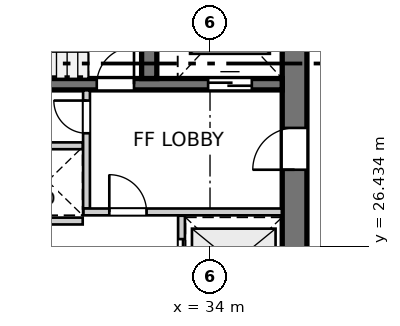
"""IFC4 building model, lengths in metres.
Left out: names, types, materials, properties, quantities, classifications, styles, units other than length and angle.
Written with IfcOpenShell. Run it as: python <this file> out.ifc"""

import sys

from ifc_helpers import new_model, si_unit, direction, frame, frame_2d, origin, place, context, subcontext, project, spatial, rectangle, extrude, source, transform, mapped, element, fill, save


model = new_model("IFC4")
c1 = context("Model", 3, precision=1e-05, world=origin(), true_north=direction((0.0, 1.0)))
c2 = subcontext(c1, "Body", "Model", "MODEL_VIEW")
j1 = project(units=[si_unit("LENGTHUNIT", "METRE"), si_unit("PLANEANGLEUNIT", "RADIAN")], contexts=[c1])
p1 = place(None, origin())
s1 = spatial("IfcSite", under=j1, at=p1, CompositionType="ELEMENT")
p2 = place(p1, origin())
s2 = spatial("IfcBuilding", under=s1, at=p2, CompositionType="ELEMENT")
p3 = place(p2, frame((0.0, 0.0, 89.6)))
s3 = spatial("IfcBuildingStorey", under=s2, at=p3, CompositionType="ELEMENT", Elevation=89.6)
p4 = place(p3, frame((36.225, 18.2, 0.0), z_axis=(0.0, 0.0, 1.0), x_axis=(0.0, 1.0, 0.0)))
e1 = element("IfcWall", 1, at=p4, inside=s3, PredefinedType="SHEAR", context=c2, shape_type="SweptSolid", body=[
    extrude(rectangle(XDim=15.6, YDim=0.65, at=frame_2d((7.8, 0.0))), origin(), (0.0, 0.0, 1.0), 2.95),
])
p5 = place(p4, frame((4.25, 0.0, 0.0)))
e2 = element("IfcOpeningElement", 2, at=p5, cuts=e1, PredefinedType="OPENING", context=c2, shape_type="SweptSolid", body=[
    extrude(rectangle(XDim=1.1, YDim=2.15, at=frame_2d((0.55, 1.075))), frame((0.0, 0.335, 0.0), z_axis=(0.0, -1.0, 0.0), x_axis=(1.0, 0.0, 0.0)), (0.0, 0.0, 1.0), 0.67),
])
p6 = place(p4, frame((10.25, 0.0, 0.0)))
e3 = element("IfcOpeningElement", 3, at=p6, cuts=e1, PredefinedType="OPENING", context=c2, shape_type="SweptSolid", body=[
    extrude(rectangle(XDim=1.1, YDim=2.15, at=frame_2d((0.55, 1.075))), frame((0.0, 0.335, 0.0), z_axis=(0.0, -1.0, 0.0), x_axis=(1.0, 0.0, 0.0)), (0.0, 0.0, 1.0), 0.67),
])
p7 = place(p3, frame((24.8, 30.7, 0.0), z_axis=(0.0, 0.0, 1.0), x_axis=(1.0, 0.0, 0.0)))
e4 = element("IfcWall", 4, at=p7, inside=s3, PredefinedType="SHEAR", context=c2, shape_type="SweptSolid", body=[
    extrude(rectangle(XDim=11.1, YDim=0.3, at=frame_2d((5.55, 0.0))), origin(), (0.0, 0.0, 1.0), 2.95),
])
p8 = place(p7, frame((6.22, 0.0, 0.0)))
e5 = element("IfcOpeningElement", 5, at=p8, cuts=e4, PredefinedType="OPENING", context=c2, shape_type="SweptSolid", body=[
    extrude(rectangle(XDim=0.98, YDim=2.15, at=frame_2d((0.49, 1.075))), frame((0.0, 0.16, 0.0), z_axis=(0.0, -1.0, 0.0), x_axis=(1.0, 0.0, 0.0)), (0.0, 0.0, 1.0), 0.32),
])
p9 = place(p7, frame((9.15, 0.0, 0.0)))
e6 = element("IfcOpeningElement", 6, at=p9, cuts=e4, PredefinedType="OPENING", context=c2, shape_type="SweptSolid", body=[
    extrude(rectangle(XDim=1.15, YDim=2.15, at=frame_2d((0.575, 1.075))), frame((0.0, 0.16, 0.0), z_axis=(0.0, -1.0, 0.0), x_axis=(1.0, 0.0, 0.0)), (0.0, 0.0, 1.0), 0.32),
])
p10 = place(p3, frame((32.4, 30.85, 0.0), z_axis=(0.0, 0.0, 1.0), x_axis=(0.0, 1.0, 0.0)))
e7 = element("IfcWall", 7, at=p10, inside=s3, PredefinedType="SHEAR", context=c2, shape_type="SweptSolid", body=[
    extrude(rectangle(XDim=2.95, YDim=0.4, at=frame_2d((1.475, 0.0))), origin(), (0.0, 0.0, 1.0), 2.95),
])
p11 = place(p3, frame((30.75, 27.43, 0.0), z_axis=(0.0, 0.0, 1.0), x_axis=(0.0, 1.0, 0.0)))
e8 = element("IfcWall", 8, at=p11, inside=s3, PredefinedType="PARTITIONING", context=c2, shape_type="SweptSolid", body=[
    extrude(rectangle(XDim=3.11, YDim=0.18, at=frame_2d((1.555, 0.0))), origin(), (0.0, 0.0, 1.0), 2.95),
])
p12 = place(p11, frame((1.98, 0.0, 0.0)))
e9 = element("IfcOpeningElement", 9, at=p12, cuts=e8, PredefinedType="OPENING", context=c2, shape_type="SweptSolid", body=[
    extrude(rectangle(XDim=0.86, YDim=2.05, at=frame_2d((0.43, 1.025))), frame((0.0, 0.1, 0.0), z_axis=(0.0, -1.0, 0.0), x_axis=(1.0, 0.0, 0.0)), (0.0, 0.0, 1.0), 0.2),
])
p13 = place(p3, frame((30.67, 27.34, 0.0), z_axis=(0.0, 0.0, 1.0), x_axis=(1.0, 0.0, 0.0)))
e10 = element("IfcWall", 10, at=p13, inside=s3, PredefinedType="PARTITIONING", context=c2, shape_type="SweptSolid", body=[
    extrude(rectangle(XDim=5.22, YDim=0.18, at=frame_2d((2.61, 0.0))), origin(), (0.0, 0.0, 1.0), 2.95),
])
p14 = place(p13, frame((0.68, 0.0, 0.0)))
e11 = element("IfcOpeningElement", 11, at=p14, cuts=e10, PredefinedType="OPENING", context=c2, shape_type="SweptSolid", body=[
    extrude(rectangle(XDim=0.98, YDim=2.15, at=frame_2d((0.49, 1.075))), frame((0.0, 0.1, 0.0), z_axis=(0.0, -1.0, 0.0), x_axis=(1.0, 0.0, 0.0)), (0.0, 0.0, 1.0), 0.2),
])
p15 = place(p3, frame((33.25, 24.76, 0.0), z_axis=(0.0, 0.0, 1.0), x_axis=(0.0, 1.0, 0.0)))
e12 = element("IfcWall", 12, at=p15, inside=s3, PredefinedType="PARTITIONING", context=c2, shape_type="SweptSolid", body=[
    extrude(rectangle(XDim=2.48, YDim=0.18, at=frame_2d((1.24, 0.0))), origin(), (0.0, 0.0, 1.0), 2.95),
])
p16 = place(p15, frame((0.615, 0.0, 0.0)))
e13 = element("IfcOpeningElement", 13, at=p16, cuts=e12, PredefinedType="OPENING", context=c2, shape_type="SweptSolid", body=[
    extrude(rectangle(XDim=1.25, YDim=2.15, at=frame_2d((0.625, 1.075))), frame((0.0, 0.1, 0.0), z_axis=(0.0, -1.0, 0.0), x_axis=(1.0, 0.0, 0.0)), (0.0, 0.0, 1.0), 0.2),
])
p17 = place(p3, frame((24.81, 29.08, 0.0), z_axis=(0.0, 0.0, 1.0), x_axis=(1.0, 0.0, 0.0)))
e14 = element("IfcWall", 14, at=p17, inside=s3, PredefinedType="PARTITIONING", context=c2, shape_type="SweptSolid", body=[
    extrude(rectangle(XDim=5.84, YDim=0.18, at=frame_2d((2.92, 0.0))), origin(), (0.0, 0.0, 1.0), 2.95),
])
p18 = place(p3, frame((28.825, 27.1, 0.0), z_axis=(0.0, 0.0, 1.0), x_axis=(1.0, 0.0, 0.0)))
e15 = element("IfcWall", 15, at=p18, inside=s3, PredefinedType="PARTITIONING", context=c2, shape_type="SweptSolid", body=[
    extrude(rectangle(XDim=1.825, YDim=0.18, at=frame_2d((0.913, 0.0))), origin(), (0.0, 0.0, 1.0), 2.95),
])
m1 = source(origin(), c2, "Body", "SweptSolid", [
    extrude(rectangle(XDim=0.98, YDim=2.15, at=frame_2d((0.49, 1.075))), frame((0.0, 0.025, 0.0), z_axis=(0.0, -1.0, 0.0), x_axis=(1.0, 0.0, 0.0)), (0.0, 0.0, 1.0), 0.05),
])
p19 = place(p8, origin())
e16 = element("IfcDoor", 16, at=p19, inside=s3, OperationType="SINGLE_SWING_RIGHT", PredefinedType="DOOR", context=c2, shape_type="MappedRepresentation", body=[
    mapped(m1, transform((0.0, 0.0, 0.0), x_axis=(1.0, 0.0, 0.0), y_axis=(0.0, 1.0, 0.0), z_axis=(0.0, 0.0, 1.0), scale=1.0)),
])
fill(e5, e16)
m2 = source(origin(), c2, "Body", "SweptSolid", [
    extrude(rectangle(XDim=1.15, YDim=2.15, at=frame_2d((0.575, 1.075))), frame((0.0, 0.025, 0.0), z_axis=(0.0, -1.0, 0.0), x_axis=(1.0, 0.0, 0.0)), (0.0, 0.0, 1.0), 0.05),
])
p20 = place(p9, origin())
e17 = element("IfcDoor", 17, at=p20, inside=s3, OperationType="DOUBLE_DOOR_SLIDING", PredefinedType="DOOR", context=c2, shape_type="MappedRepresentation", body=[
    mapped(m2, transform((0.0, 0.0, 0.0), x_axis=(1.0, 0.0, 0.0), y_axis=(0.0, 1.0, 0.0), z_axis=(0.0, 0.0, 1.0), scale=1.0)),
])
fill(e6, e17)
m3 = source(origin(), c2, "Body", "SweptSolid", [
    extrude(rectangle(XDim=1.1, YDim=2.15, at=frame_2d((0.55, 1.075))), frame((0.0, 0.025, 0.0), z_axis=(0.0, -1.0, 0.0), x_axis=(1.0, 0.0, 0.0)), (0.0, 0.0, 1.0), 0.05),
])
p21 = place(p6, origin())
e18 = element("IfcDoor", 18, at=p21, inside=s3, OperationType="SINGLE_SWING_LEFT", PredefinedType="DOOR", context=c2, shape_type="MappedRepresentation", body=[
    mapped(m3, transform((0.0, 0.0, 0.0), x_axis=(1.0, 0.0, 0.0), y_axis=(0.0, 1.0, 0.0), z_axis=(0.0, 0.0, 1.0), scale=1.0)),
])
fill(e3, e18)
m4 = source(origin(), c2, "Body", "SweptSolid", [
    extrude(rectangle(XDim=0.86, YDim=2.05, at=frame_2d((0.43, 1.025))), frame((0.0, 0.025, 0.0), z_axis=(0.0, -1.0, 0.0), x_axis=(1.0, 0.0, 0.0)), (0.0, 0.0, 1.0), 0.05),
])
p22 = place(p12, origin())
e19 = element("IfcDoor", 19, at=p22, inside=s3, OperationType="SINGLE_SWING_RIGHT", PredefinedType="DOOR", context=c2, shape_type="MappedRepresentation", body=[
    mapped(m4, transform((0.0, 0.0, 0.0), x_axis=(1.0, 0.0, 0.0), y_axis=(0.0, 1.0, 0.0), z_axis=(0.0, 0.0, 1.0), scale=1.0)),
])
fill(e9, e19)
p23 = place(p14, origin())
e20 = element("IfcDoor", 20, at=p23, inside=s3, OperationType="SINGLE_SWING_LEFT", PredefinedType="DOOR", context=c2, shape_type="MappedRepresentation", body=[
    mapped(m1, transform((0.0, 0.0, 0.0), x_axis=(1.0, 0.0, 0.0), y_axis=(0.0, 1.0, 0.0), z_axis=(0.0, 0.0, 1.0), scale=1.0)),
])
fill(e11, e20)
m5 = source(origin(), c2, "Body", "SweptSolid", [
    extrude(rectangle(XDim=1.25, YDim=2.15, at=frame_2d((0.625, 1.075))), frame((0.0, 0.025, 0.0), z_axis=(0.0, -1.0, 0.0), x_axis=(1.0, 0.0, 0.0)), (0.0, 0.0, 1.0), 0.05),
])
p24 = place(p16, origin())
e21 = element("IfcDoor", 21, at=p24, inside=s3, OperationType="DOUBLE_DOOR_SLIDING", PredefinedType="DOOR", context=c2, shape_type="MappedRepresentation", body=[
    mapped(m5, transform((0.0, 0.0, 0.0), x_axis=(1.0, 0.0, 0.0), y_axis=(0.0, 1.0, 0.0), z_axis=(0.0, 0.0, 1.0), scale=1.0)),
])
fill(e13, e21)
save(model, sys.argv[1])
